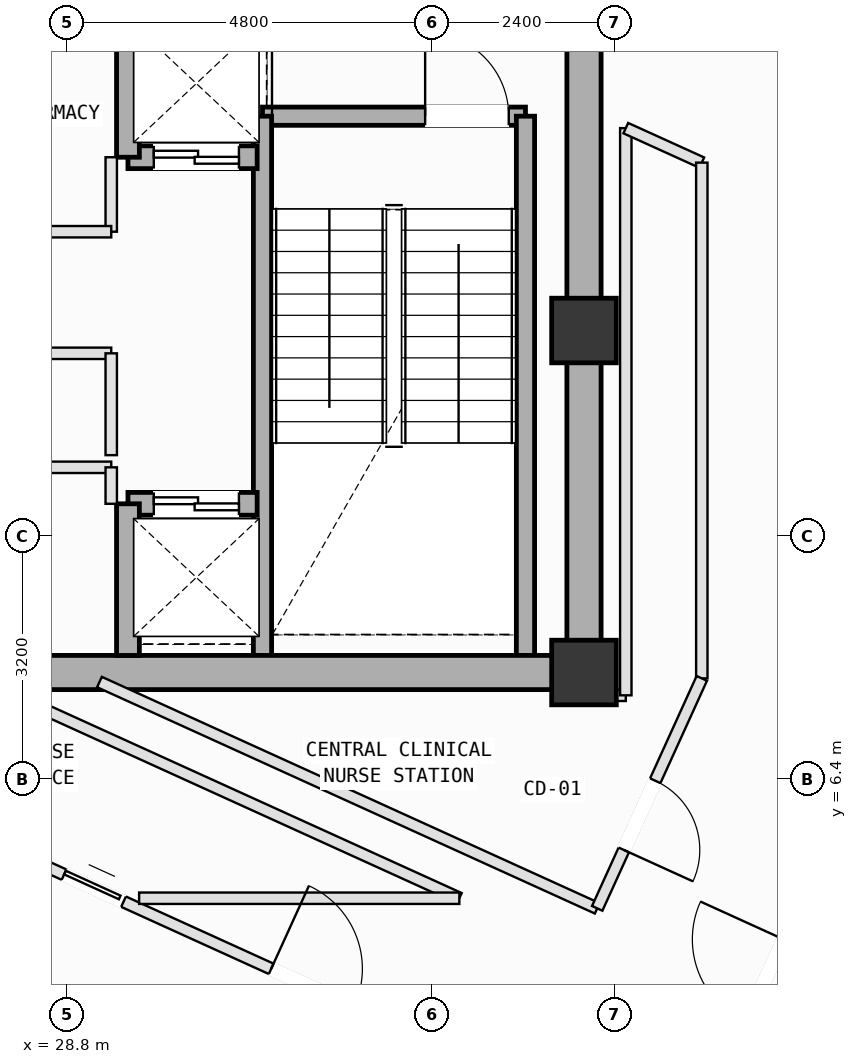
"""IFC4 building model, lengths in metres.
Left out: names, types, materials, properties, quantities, classifications, styles, units other than length and angle.
Written with IfcOpenShell. Run it as: python <this file> out.ifc"""

import sys

from ifc_helpers import new_model, si_unit, direction, frame, frame_2d, origin, origin_2d, place, context, subcontext, project, spatial, rectangle, extrude, element, fill, save


model = new_model("IFC4")
c1 = context("Model", 3, precision=1e-05, world=origin(), true_north=direction((0.0, 1.0)))
c2 = subcontext(c1, "Body", "Model", "MODEL_VIEW")
j1 = project(units=[si_unit("LENGTHUNIT", "METRE"), si_unit("PLANEANGLEUNIT", "RADIAN")], contexts=[c1])
p1 = place(None, origin())
s1 = spatial("IfcSite", under=j1, at=p1, CompositionType="ELEMENT")
p2 = place(p1, origin())
s2 = spatial("IfcBuilding", under=s1, at=p2, CompositionType="ELEMENT")
p3 = place(p2, frame((0.0, 0.0, 304.6)))
s3 = spatial("IfcBuildingStorey", under=s2, at=p3, CompositionType="ELEMENT", Elevation=304.6)
for number, where, z_axis, x_axis in (
    (1, (35.6, 7.8, 0.0), (0.0, 0.0, 1.0), (1.0, 0.0, 0.0)),
    (2, (35.6, 12.3, 0.0), (0.0, 0.0, 1.0), (1.0, 0.0, 0.0)),
):
    element("IfcColumn", number, at=place(p3, frame(where, z_axis=z_axis, x_axis=x_axis)), inside=s3, PredefinedType="COLUMN", context=c2, shape_type="SweptSolid", body=[
        extrude(rectangle(XDim=0.85, YDim=0.85, at=origin_2d()), origin(), (0.0, 0.0, 1.0), 4.0),
    ])
p4 = place(p3, frame((31.37, 15.12, 0.0), z_axis=(0.0, 0.0, 1.0), x_axis=(1.0, 0.0, 0.0)))
e3 = element("IfcWall", 3, at=p4, inside=s3, PredefinedType="SOLIDWALL", context=c2, shape_type="SweptSolid", body=[
    extrude(rectangle(XDim=3.46, YDim=0.24, at=frame_2d((1.73, 0.0))), origin(), (0.0, 0.0, 1.0), 3.78),
])
p5 = place(p4, frame((2.14, 0.0, 0.0)))
e4 = element("IfcOpeningElement", 4, at=p5, cuts=e3, PredefinedType="OPENING", context=c2, shape_type="SweptSolid", body=[
    extrude(rectangle(XDim=1.1, YDim=2.15, at=frame_2d((0.55, 1.075))), frame((0.0, 0.13, 0.0), z_axis=(0.0, -1.0, 0.0), x_axis=(1.0, 0.0, 0.0)), (0.0, 0.0, 1.0), 0.26),
])
for number, where, z_axis, x_axis in (
    (5, (34.83, 15.12, 0.0), (0.0, 0.0, 1.0), (0.0, -1.0, 0.0)),
    (6, (31.37, 8.025, 0.0), (0.0, 0.0, 1.0), (0.0, 1.0, 0.0)),
):
    element("IfcWall", number, at=place(p3, frame(where, z_axis=z_axis, x_axis=x_axis)), inside=s3, PredefinedType="SOLIDWALL", context=c2, shape_type="SweptSolid", body=[
        extrude(rectangle(XDim=7.095, YDim=0.24, at=frame_2d((3.548, 0.0))), origin(), (0.0, 0.0, 1.0), 3.78),
    ])
p6 = place(p3, frame((24.8, 7.8, 0.0), z_axis=(0.0, 0.0, 1.0), x_axis=(1.0, 0.0, 0.0)))
e7 = element("IfcWall", 7, at=p6, inside=s3, PredefinedType="SHEAR", context=c2, shape_type="SweptSolid", body=[
    extrude(rectangle(XDim=10.8, YDim=0.45, at=frame_2d((5.4, 0.0))), origin(), (0.0, 0.0, 1.0), 3.78),
])
p7 = place(p3, frame((35.6, 7.8, 0.0), z_axis=(0.0, 0.0, 1.0), x_axis=(0.0, 1.0, 0.0)))
e8 = element("IfcWall", 8, at=p7, inside=s3, PredefinedType="SHEAR", context=c2, shape_type="SweptSolid", body=[
    extrude(rectangle(XDim=9.0, YDim=0.45, at=frame_2d((4.5, 0.0))), origin(), (0.0, 0.0, 1.0), 3.78),
])
p8 = place(p3, frame((29.6, 10.02, 0.0), z_axis=(0.0, 0.0, 1.0), x_axis=(1.0, 0.0, 0.0)))
e9 = element("IfcWall", 9, at=p8, inside=s3, PredefinedType="SOLIDWALL", context=c2, shape_type="SweptSolid", body=[
    extrude(rectangle(XDim=1.7, YDim=0.3, at=frame_2d((0.85, 0.0))), origin(), (0.0, 0.0, 1.0), 3.78),
])
p9 = place(p8, frame((0.34, 0.0, 0.0)))
e10 = element("IfcOpeningElement", 10, at=p9, cuts=e9, PredefinedType="OPENING", context=c2, shape_type="SweptSolid", body=[
    extrude(rectangle(XDim=1.12, YDim=2.15, at=frame_2d((0.56, 1.075))), frame((0.0, 0.16, 0.0), z_axis=(0.0, -1.0, 0.0), x_axis=(1.0, 0.0, 0.0)), (0.0, 0.0, 1.0), 0.32),
])
p10 = place(p3, frame((29.6, 8.025, 0.0), z_axis=(0.0, 0.0, 1.0), x_axis=(0.0, 1.0, 0.0)))
e11 = element("IfcWall", 11, at=p10, inside=s3, PredefinedType="SOLIDWALL", context=c2, shape_type="SweptSolid", body=[
    extrude(rectangle(XDim=1.995, YDim=0.3, at=frame_2d((0.998, 0.0))), origin(), (0.0, 0.0, 1.0), 3.78),
])
p11 = place(p3, frame((29.6, 14.58, 0.0), z_axis=(0.0, 0.0, 1.0), x_axis=(1.0, 0.0, 0.0)))
e12 = element("IfcWall", 12, at=p11, inside=s3, PredefinedType="SOLIDWALL", context=c2, shape_type="SweptSolid", body=[
    extrude(rectangle(XDim=1.7, YDim=0.3, at=frame_2d((0.85, 0.0))), origin(), (0.0, 0.0, 1.0), 3.78),
])
p12 = place(p11, frame((0.34, 0.0, 0.0)))
e13 = element("IfcOpeningElement", 13, at=p12, cuts=e12, PredefinedType="OPENING", context=c2, shape_type="SweptSolid", body=[
    extrude(rectangle(XDim=1.12, YDim=2.15, at=frame_2d((0.56, 1.075))), frame((0.0, 0.16, 0.0), z_axis=(0.0, -1.0, 0.0), x_axis=(1.0, 0.0, 0.0)), (0.0, 0.0, 1.0), 0.32),
])
p13 = place(p3, frame((29.6, 14.58, 0.0), z_axis=(0.0, 0.0, 1.0), x_axis=(0.0, 1.0, 0.0)))
e14 = element("IfcWall", 14, at=p13, inside=s3, PredefinedType="SOLIDWALL", context=c2, shape_type="SweptSolid", body=[
    extrude(rectangle(XDim=2.22, YDim=0.3, at=frame_2d((1.11, 0.0))), origin(), (0.0, 0.0, 1.0), 3.78),
])
p14 = place(p3, frame((25.98, 10.5, 0.0), z_axis=(0.0, 0.0, 1.0), x_axis=(1.0, 0.0, 0.0)))
e15 = element("IfcWall", 15, at=p14, inside=s3, PredefinedType="PARTITIONING", context=c2, shape_type="SweptSolid", body=[
    extrude(rectangle(XDim=3.4, YDim=0.15, at=frame_2d((1.7, 0.0))), origin(), (0.0, 0.0, 1.0), 3.78),
])
p15 = place(p3, frame((29.38, 10.5, 0.0), z_axis=(0.0, 0.0, 1.0), x_axis=(0.0, -1.0, 0.0)))
e16 = element("IfcWall", 16, at=p15, inside=s3, PredefinedType="PARTITIONING", context=c2, shape_type="SweptSolid", body=[
    extrude(rectangle(XDim=0.48, YDim=0.15, at=frame_2d((0.24, 0.0))), origin(), (0.0, 0.0, 1.0), 3.78),
])
p16 = place(p3, frame((25.98, 12.0, 0.0), z_axis=(0.0, 0.0, 1.0), x_axis=(1.0, 0.0, 0.0)))
e17 = element("IfcWall", 17, at=p16, inside=s3, PredefinedType="PARTITIONING", context=c2, shape_type="SweptSolid", body=[
    extrude(rectangle(XDim=3.4, YDim=0.15, at=frame_2d((1.7, 0.0))), origin(), (0.0, 0.0, 1.0), 3.78),
])
p17 = place(p16, frame((1.24, 0.0, 0.0)))
e18 = element("IfcOpeningElement", 18, at=p17, cuts=e17, PredefinedType="OPENING", context=c2, shape_type="SweptSolid", body=[
    extrude(rectangle(XDim=0.92, YDim=2.1, at=frame_2d((0.46, 1.05))), frame((0.0, 0.085, 0.0), z_axis=(0.0, -1.0, 0.0), x_axis=(1.0, 0.0, 0.0)), (0.0, 0.0, 1.0), 0.17),
])
p18 = place(p3, frame((29.38, 12.0, 0.0), z_axis=(0.0, 0.0, 1.0), x_axis=(0.0, -1.0, 0.0)))
e19 = element("IfcWall", 19, at=p18, inside=s3, PredefinedType="PARTITIONING", context=c2, shape_type="SweptSolid", body=[
    extrude(rectangle(XDim=1.34, YDim=0.15, at=frame_2d((0.67, 0.0))), origin(), (0.0, 0.0, 1.0), 3.78),
])
p19 = place(p3, frame((29.38, 14.58, 0.0), z_axis=(0.0, 0.0, 1.0), x_axis=(0.0, -1.0, 0.0)))
e20 = element("IfcWall", 20, at=p19, inside=s3, PredefinedType="PARTITIONING", context=c2, shape_type="SweptSolid", body=[
    extrude(rectangle(XDim=0.98, YDim=0.15, at=frame_2d((0.49, 0.0))), origin(), (0.0, 0.0, 1.0), 3.78),
])
p20 = place(p3, frame((29.38, 13.6, 0.0), z_axis=(0.0, 0.0, 1.0), x_axis=(-1.0, 0.0, 0.0)))
e21 = element("IfcWall", 21, at=p20, inside=s3, PredefinedType="PARTITIONING", context=c2, shape_type="SweptSolid", body=[
    extrude(rectangle(XDim=3.2, YDim=0.15, at=frame_2d((1.6, 0.0))), origin(), (0.0, 0.0, 1.0), 3.78),
])
p21 = place(p20, frame((1.1, 0.0, 0.0)))
e22 = element("IfcOpeningElement", 22, at=p21, cuts=e21, PredefinedType="OPENING", context=c2, shape_type="SweptSolid", body=[
    extrude(rectangle(XDim=1.0, YDim=2.12, at=frame_2d((0.5, 1.06))), frame((0.0, 0.085, 0.0), z_axis=(0.0, -1.0, 0.0), x_axis=(1.0, 0.0, 0.0)), (0.0, 0.0, 1.0), 0.17),
])
p22 = place(p3, frame((37.328, 2.316, 0.0), z_axis=(0.0, 0.0, 1.0), x_axis=(0.414020000743, 0.910267784218, 0.0)))
e23 = element("IfcWall", 23, at=p22, inside=s3, PredefinedType="PARTITIONING", context=c2, shape_type="SweptSolid", body=[
    extrude(rectangle(XDim=3.135, YDim=0.15, at=frame_2d((1.568, 0.0))), origin(), (0.0, 0.0, 1.0), 3.78),
])
p23 = place(p22, frame((0.968, 0.0, 0.0)))
e24 = element("IfcOpeningElement", 24, at=p23, cuts=e23, PredefinedType="OPENING", context=c2, shape_type="SweptSolid", body=[
    extrude(rectangle(XDim=1.2, YDim=2.15, at=frame_2d((0.6, 1.075))), frame((0.0, 0.085, 0.0), z_axis=(0.0, -1.0, 0.0), x_axis=(1.0, 0.0, 0.0)), (0.0, 0.0, 1.0), 0.17),
])
p24 = place(p3, frame((28.072, 5.453, 0.0), z_axis=(0.0, 0.0, 1.0), x_axis=(0.910328957898, -0.413885477412, 0.0)))
e25 = element("IfcWall", 25, at=p24, inside=s3, PredefinedType="PARTITIONING", context=c2, shape_type="SweptSolid", body=[
    extrude(rectangle(XDim=7.354, YDim=0.15, at=frame_2d((3.677, 0.0))), origin(), (0.0, 0.0, 1.0), 3.78),
])
p25 = place(p24, frame((3.749, 0.0, 0.0)))
e26 = element("IfcOpeningElement", 26, at=p25, cuts=e25, PredefinedType="OPENING", context=c2, shape_type="SweptSolid", body=[
    extrude(rectangle(XDim=1.2, YDim=2.15, at=frame_2d((0.6, 1.075))), frame((0.0, 0.085, 0.0), z_axis=(0.0, -1.0, 0.0), x_axis=(1.0, 0.0, 0.0)), (0.0, 0.0, 1.0), 0.17),
])
p26 = place(p24, frame((0.755, 0.0, 0.0)))
e27 = element("IfcOpeningElement", 27, at=p26, cuts=e25, PredefinedType="OPENING", context=c2, shape_type="SweptSolid", body=[
    extrude(rectangle(XDim=0.86, YDim=2.06, at=frame_2d((0.43, 1.03))), frame((0.0, 0.085, 0.0), z_axis=(0.0, -1.0, 0.0), x_axis=(1.0, 0.0, 0.0)), (0.0, 0.0, 1.0), 0.17),
])
p27 = place(p3, frame((35.774, 4.697, 0.0), z_axis=(0.0, 0.0, 1.0), x_axis=(-0.910299058276, 0.413951234449, 0.0)))
e28 = element("IfcWall", 28, at=p27, inside=s3, PredefinedType="PARTITIONING", context=c2, shape_type="SweptSolid", body=[
    extrude(rectangle(XDim=7.194, YDim=0.15, at=frame_2d((3.597, 0.0))), origin(), (0.0, 0.0, 1.0), 3.78),
])
p28 = place(p3, frame((35.6, 7.5, 0.0), z_axis=(0.0, 0.0, 1.0), x_axis=(1.0, 0.0, 0.0)))
e29 = element("IfcWall", 29, at=p28, inside=s3, PredefinedType="PARTITIONING", context=c2, shape_type="SweptSolid", body=[
    extrude(rectangle(XDim=0.55, YDim=0.15, at=frame_2d((0.275, 0.0))), origin(), (0.0, 0.0, 1.0), 2.765),
])
p29 = place(p3, frame((36.15, 7.5, 0.0), z_axis=(0.0, 0.0, 1.0), x_axis=(0.0, 1.0, 0.0)))
e30 = element("IfcWall", 30, at=p29, inside=s3, PredefinedType="PARTITIONING", context=c2, shape_type="SweptSolid", body=[
    extrude(rectangle(XDim=7.463, YDim=0.15, at=frame_2d((3.731, 0.0))), origin(), (0.0, 0.0, 1.0), 3.78),
])
p30 = place(p3, frame((36.15, 14.963, 0.0), z_axis=(0.0, 0.0, 1.0), x_axis=(0.910602348761, -0.413283634362, 0.0)))
e31 = element("IfcWall", 31, at=p30, inside=s3, PredefinedType="PARTITIONING", context=c2, shape_type="SweptSolid", body=[
    extrude(rectangle(XDim=1.098, YDim=0.15, at=frame_2d((0.549, 0.0))), origin(), (0.0, 0.0, 1.0), 3.78),
])
p31 = place(p3, frame((37.15, 14.509, 0.0), z_axis=(0.0, 0.0, 1.0), x_axis=(0.0, -1.0, 0.0)))
e32 = element("IfcWall", 32, at=p31, inside=s3, PredefinedType="PARTITIONING", context=c2, shape_type="SweptSolid", body=[
    extrude(rectangle(XDim=6.786, YDim=0.15, at=frame_2d((3.393, 0.0))), origin(), (0.0, 0.0, 1.0), 3.78),
])
p32 = place(p3, frame((37.15, 7.723, 0.0), z_axis=(0.0, 0.0, 1.0), x_axis=(-0.413946814598, -0.910301068155, 0.0)))
e33 = element("IfcWall", 33, at=p32, inside=s3, PredefinedType="PARTITIONING", context=c2, shape_type="SweptSolid", body=[
    extrude(rectangle(XDim=3.324, YDim=0.15, at=frame_2d((1.662, 0.0))), origin(), (0.0, 0.0, 1.0), 3.78),
])
p33 = place(p32, frame((1.479, 0.0, 0.0)))
e34 = element("IfcOpeningElement", 34, at=p33, cuts=e33, PredefinedType="OPENING", context=c2, shape_type="SweptSolid", body=[
    extrude(rectangle(XDim=1.0, YDim=2.12, at=frame_2d((0.5, 1.06))), frame((0.0, 0.085, 0.0), z_axis=(0.0, -1.0, 0.0), x_axis=(1.0, 0.0, 0.0)), (0.0, 0.0, 1.0), 0.17),
])
p34 = place(p3, frame((27.703, 7.675, 0.0), z_axis=(0.0, 0.0, 1.0), x_axis=(0.910320248234, -0.413904633527, 0.0)))
e35 = element("IfcWall", 35, at=p34, inside=s3, PredefinedType="PARTITIONING", context=c2, shape_type="SweptSolid", body=[
    extrude(rectangle(XDim=6.874, YDim=0.15, at=frame_2d((3.437, 0.0))), origin(), (0.0, 0.0, 1.0), 3.78),
])
p35 = place(p3, frame((33.96, 4.83, 0.0), z_axis=(0.0, 0.0, 1.0), x_axis=(-1.0, 0.0, 0.0)))
e36 = element("IfcWall", 36, at=p35, inside=s3, PredefinedType="PARTITIONING", context=c2, shape_type="SweptSolid", body=[
    extrude(rectangle(XDim=4.213, YDim=0.15, at=frame_2d((2.106, 0.0))), origin(), (0.0, 0.0, 1.0), 3.78),
])
p36 = place(p5, origin())
e37 = element("IfcDoor", 37, at=p36, inside=s3, OperationType="SINGLE_SWING_LEFT", PredefinedType="DOOR", context=c2, shape_type="SweptSolid", body=[
    extrude(rectangle(XDim=1.1, YDim=2.15, at=frame_2d((0.55, 1.075))), frame((0.0, 0.025, 0.0), z_axis=(0.0, -1.0, 0.0), x_axis=(1.0, 0.0, 0.0)), (0.0, 0.0, 1.0), 0.05),
])
fill(e4, e37)
p37 = place(p9, origin())
e38 = element("IfcDoor", 38, at=p37, inside=s3, OperationType="DOUBLE_DOOR_SLIDING", PredefinedType="DOOR", context=c2, shape_type="SweptSolid", body=[
    extrude(rectangle(XDim=1.12, YDim=2.15, at=frame_2d((0.56, 1.075))), frame((0.0, 0.025, 0.0), z_axis=(0.0, -1.0, 0.0), x_axis=(1.0, 0.0, 0.0)), (0.0, 0.0, 1.0), 0.05),
])
fill(e10, e38)
p38 = place(p12, origin())
e39 = element("IfcDoor", 39, at=p38, inside=s3, OperationType="DOUBLE_DOOR_SLIDING", PredefinedType="DOOR", context=c2, shape_type="SweptSolid", body=[
    extrude(rectangle(XDim=1.12, YDim=2.15, at=frame_2d((0.56, 1.075))), frame((0.0, 0.025, 0.0), z_axis=(0.0, -1.0, 0.0), x_axis=(1.0, 0.0, 0.0)), (0.0, 0.0, 1.0), 0.05),
])
fill(e13, e39)
p39 = place(p23, origin())
e40 = element("IfcDoor", 40, at=p39, inside=s3, OperationType="SINGLE_SWING_RIGHT", PredefinedType="DOOR", context=c2, shape_type="SweptSolid", body=[
    extrude(rectangle(XDim=1.2, YDim=2.15, at=frame_2d((0.6, 1.075))), frame((0.0, 0.025, 0.0), z_axis=(0.0, -1.0, 0.0), x_axis=(1.0, 0.0, 0.0)), (0.0, 0.0, 1.0), 0.05),
])
fill(e24, e40)
p40 = place(p25, origin())
e41 = element("IfcDoor", 41, at=p40, inside=s3, OperationType="SINGLE_SWING_LEFT", PredefinedType="DOOR", context=c2, shape_type="SweptSolid", body=[
    extrude(rectangle(XDim=1.2, YDim=2.15, at=frame_2d((0.6, 1.075))), frame((0.0, 0.025, 0.0), z_axis=(0.0, -1.0, 0.0), x_axis=(1.0, 0.0, 0.0)), (0.0, 0.0, 1.0), 0.05),
])
fill(e26, e41)
p41 = place(p33, origin())
e42 = element("IfcDoor", 42, at=p41, inside=s3, OperationType="SINGLE_SWING_RIGHT", PredefinedType="DOOR", context=c2, shape_type="SweptSolid", body=[
    extrude(rectangle(XDim=1.0, YDim=2.12, at=frame_2d((0.5, 1.06))), frame((0.0, 0.025, 0.0), z_axis=(0.0, -1.0, 0.0), x_axis=(1.0, 0.0, 0.0)), (0.0, 0.0, 1.0), 0.05),
])
fill(e34, e42)
p42 = place(p26, origin())
e43 = element("IfcDoor", 43, at=p42, inside=s3, OperationType="SLIDING_TO_LEFT", PredefinedType="DOOR", context=c2, shape_type="SweptSolid", body=[
    extrude(rectangle(XDim=0.86, YDim=2.06, at=frame_2d((0.43, 1.03))), frame((0.0, 0.025, 0.0), z_axis=(0.0, -1.0, 0.0), x_axis=(1.0, 0.0, 0.0)), (0.0, 0.0, 1.0), 0.05),
])
fill(e27, e43)
save(model, sys.argv[1])
